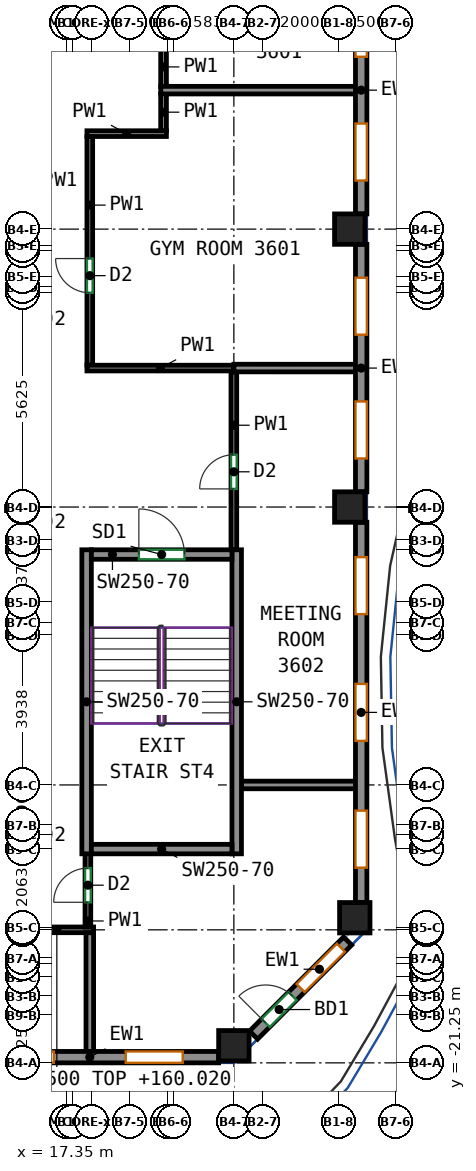
"""IFC4 building model, lengths in metres.
Left out: names, types, materials, properties, quantities, classifications, styles, units other than length and angle.
Written with IfcOpenShell. Run it as: python <this file> out.ifc"""

import sys

from ifc_helpers import new_model, si_unit, direction, frame, frame_2d, origin, origin_2d, place, context, subcontext, project, spatial, rectangle, extrude, source, transform, mapped, element, fill, save


model = new_model("IFC4")
c1 = context("Model", 3, precision=1e-05, world=origin(), true_north=direction((0.0, 1.0)))
c2 = subcontext(c1, "Body", "Model", "MODEL_VIEW")
j1 = project(units=[si_unit("LENGTHUNIT", "METRE"), si_unit("PLANEANGLEUNIT", "RADIAN")], contexts=[c1])
p1 = place(None, origin())
s1 = spatial("IfcSite", under=j1, at=p1, CompositionType="ELEMENT")
p2 = place(p1, origin())
s2 = spatial("IfcBuilding", under=s1, at=p2, CompositionType="ELEMENT")
p3 = place(p2, frame((0.0, 0.0, 157.5)))
s3 = spatial("IfcBuildingStorey", under=s2, at=p3, CompositionType="ELEMENT", Elevation=157.5)
m1 = source(origin(), c2, "Body", "SweptSolid", [
    extrude(rectangle(XDim=0.8, YDim=0.8, at=origin_2d()), origin(), (0.0, 0.0, 1.0), 3.12),
])
for number, where, z_axis, x_axis in (
    (1, (21.75, -20.8, 0.0), (0.0, 0.0, 1.0), (1.0, 0.0, 0.0)),
    (2, (24.8, -6.625, 0.0), (0.0, 0.0, 1.0), (1.0, 0.0, 0.0)),
    (3, (24.8, 0.688, 0.0), (0.0, 0.0, 1.0), (1.0, 0.0, 0.0)),
    (4, (24.932, -17.432, 0.0), (0.0, 0.0, 1.0), (1.0, 0.0, 0.0)),
):
    element("IfcColumn", number, at=place(p3, frame(where, z_axis=z_axis, x_axis=x_axis)), inside=s3, PredefinedType="COLUMN", context=c2, shape_type="MappedRepresentation", body=[
        mapped(m1, transform((0.0, 0.0, 0.0))),
    ])
m2 = source(origin(), c2, "Body", "SweptSolid", [
    extrude(rectangle(XDim=8.0, YDim=0.25, at=frame_2d((4.0, 0.0))), origin(), (0.0, 0.0, 1.0), 3.12),
])
for number, where, z_axis, x_axis in (
    (5, (17.875, -15.75, 0.0), (0.0, 0.0, 1.0), (0.0, 1.0, 0.0)),
    (6, (21.825, -15.75, 0.0), (0.0, 0.0, 1.0), (0.0, 1.0, 0.0)),
):
    element("IfcWall", number, at=place(p3, frame(where, z_axis=z_axis, x_axis=x_axis)), inside=s3, PredefinedType="SHEAR", context=c2, shape_type="MappedRepresentation", body=[
        mapped(m2, transform((0.0, 0.0, 0.0))),
    ])
m3 = source(origin(), c2, "Body", "SweptSolid", [
    extrude(rectangle(XDim=3.7, YDim=0.25, at=frame_2d((1.85, 0.0))), origin(), (0.0, 0.0, 1.0), 3.12),
])
p4 = place(p3, frame((18.0, -15.625, 0.0), z_axis=(0.0, 0.0, 1.0), x_axis=(1.0, 0.0, 0.0)))
e7 = element("IfcWall", 7, at=p4, inside=s3, PredefinedType="SHEAR", context=c2, shape_type="MappedRepresentation", body=[
    mapped(m3, transform((0.0, 0.0, 0.0))),
])
p5 = place(p3, frame((18.0, -7.875, 0.0), z_axis=(0.0, 0.0, 1.0), x_axis=(1.0, 0.0, 0.0)))
e8 = element("IfcWall", 8, at=p5, inside=s3, PredefinedType="SHEAR", context=c2, shape_type="MappedRepresentation", body=[
    mapped(m3, transform((0.0, 0.0, 0.0))),
])
p6 = place(p5, frame((1.25, 0.0, 0.0)))
e9 = element("IfcOpeningElement", 9, at=p6, cuts=e8, PredefinedType="OPENING", context=c2, shape_type="SweptSolid", body=[
    extrude(rectangle(XDim=1.2, YDim=2.1, at=frame_2d((0.6, 1.05))), frame((0.0, 0.135, 0.0), z_axis=(0.0, -1.0, 0.0), x_axis=(1.0, 0.0, 0.0)), (0.0, 0.0, 1.0), 0.27),
])
m4 = source(origin(), c2, "Body", "SweptSolid", [
    extrude(rectangle(XDim=6.783, YDim=0.3, at=frame_2d((3.392, 0.0))), origin(), (0.0, 0.0, 1.0), 3.12),
])
p7 = place(p3, frame((14.567, -21.1, 0.0), z_axis=(0.0, 0.0, 1.0), x_axis=(1.0, 0.0, 0.0)))
e10 = element("IfcWall", 10, at=p7, inside=s3, PredefinedType="SOLIDWALL", context=c2, shape_type="MappedRepresentation", body=[
    mapped(m4, transform((0.0, 0.0, 0.0))),
])
p8 = place(p7, frame((0.946, 0.0, 0.85)))
e11 = element("IfcOpeningElement", 11, at=p8, cuts=e10, PredefinedType="OPENING", context=c2, shape_type="SweptSolid", body=[
    extrude(rectangle(XDim=1.5, YDim=1.95, at=frame_2d((0.75, 0.975))), frame((0.0, 0.16, 0.0), z_axis=(0.0, -1.0, 0.0), x_axis=(1.0, 0.0, 0.0)), (0.0, 0.0, 1.0), 0.32),
])
p9 = place(p7, frame((4.337, 0.0, 0.85)))
e12 = element("IfcOpeningElement", 12, at=p9, cuts=e10, PredefinedType="OPENING", context=c2, shape_type="SweptSolid", body=[
    extrude(rectangle(XDim=1.5, YDim=1.95, at=frame_2d((0.75, 0.975))), frame((0.0, 0.16, 0.0), z_axis=(0.0, -1.0, 0.0), x_axis=(1.0, 0.0, 0.0)), (0.0, 0.0, 1.0), 0.32),
])
m5 = source(origin(), c2, "Body", "SweptSolid", [
    extrude(rectangle(XDim=3.5, YDim=0.3, at=frame_2d((1.75, 0.0))), origin(), (0.0, 0.0, 1.0), 3.12),
])
p10 = place(p3, frame((22.269, -20.519, 0.0), z_axis=(0.0, 0.0, 1.0), x_axis=(0.707141656123, 0.70707190453, 0.0)))
e13 = element("IfcWall", 13, at=p10, inside=s3, PredefinedType="SOLIDWALL", context=c2, shape_type="MappedRepresentation", body=[
    mapped(m5, transform((0.0, 0.0, 0.0))),
])
p11 = place(p10, frame((1.75, 0.0, 0.85)))
e14 = element("IfcOpeningElement", 14, at=p11, cuts=e13, PredefinedType="OPENING", context=c2, shape_type="SweptSolid", body=[
    extrude(rectangle(XDim=1.5, YDim=1.95, at=frame_2d((0.75, 0.975))), frame((0.0, 0.16, 0.0), z_axis=(0.0, -1.0, 0.0), x_axis=(1.0, 0.0, 0.0)), (0.0, 0.0, 1.0), 0.32),
])
p12 = place(p10, frame((0.45, 0.0, 0.0)))
e15 = element("IfcOpeningElement", 15, at=p12, cuts=e13, PredefinedType="OPENING", context=c2, shape_type="SweptSolid", body=[
    extrude(rectangle(XDim=1.0, YDim=2.1, at=frame_2d((0.5, 1.05))), frame((0.0, 0.16, 0.0), z_axis=(0.0, -1.0, 0.0), x_axis=(1.0, 0.0, 0.0)), (0.0, 0.0, 1.0), 0.32),
])
m6 = source(origin(), c2, "Body", "SweptSolid", [
    extrude(rectangle(XDim=10.007, YDim=0.3, at=frame_2d((5.003, 0.0))), origin(), (0.0, 0.0, 1.0), 3.12),
])
p13 = place(p3, frame((25.1, -17.032, 0.0), z_axis=(0.0, 0.0, 1.0), x_axis=(0.0, 1.0, 0.0)))
e16 = element("IfcWall", 16, at=p13, inside=s3, PredefinedType="SOLIDWALL", context=c2, shape_type="MappedRepresentation", body=[
    mapped(m6, transform((0.0, 0.0, 0.0))),
])
p14 = place(p13, frame((0.918, 0.0, 0.85)))
e17 = element("IfcOpeningElement", 17, at=p14, cuts=e16, PredefinedType="OPENING", context=c2, shape_type="SweptSolid", body=[
    extrude(rectangle(XDim=1.5, YDim=1.95, at=frame_2d((0.75, 0.975))), frame((0.0, 0.16, 0.0), z_axis=(0.0, -1.0, 0.0), x_axis=(1.0, 0.0, 0.0)), (0.0, 0.0, 1.0), 0.32),
])
p15 = place(p13, frame((4.253, 0.0, 0.85)))
e18 = element("IfcOpeningElement", 18, at=p15, cuts=e16, PredefinedType="OPENING", context=c2, shape_type="SweptSolid", body=[
    extrude(rectangle(XDim=1.5, YDim=1.95, at=frame_2d((0.75, 0.975))), frame((0.0, 0.16, 0.0), z_axis=(0.0, -1.0, 0.0), x_axis=(1.0, 0.0, 0.0)), (0.0, 0.0, 1.0), 0.32),
])
p16 = place(p13, frame((7.589, 0.0, 0.85)))
e19 = element("IfcOpeningElement", 19, at=p16, cuts=e16, PredefinedType="OPENING", context=c2, shape_type="SweptSolid", body=[
    extrude(rectangle(XDim=1.5, YDim=1.95, at=frame_2d((0.75, 0.975))), frame((0.0, 0.16, 0.0), z_axis=(0.0, -1.0, 0.0), x_axis=(1.0, 0.0, 0.0)), (0.0, 0.0, 1.0), 0.32),
])
m7 = source(origin(), c2, "Body", "SweptSolid", [
    extrude(rectangle(XDim=6.513, YDim=0.3, at=frame_2d((3.256, 0.0))), origin(), (0.0, 0.0, 1.0), 3.12),
])
p17 = place(p3, frame((25.1, -6.225, 0.0), z_axis=(0.0, 0.0, 1.0), x_axis=(0.0, 1.0, 0.0)))
e20 = element("IfcWall", 20, at=p17, inside=s3, PredefinedType="SOLIDWALL", context=c2, shape_type="MappedRepresentation", body=[
    mapped(m7, transform((0.0, 0.0, 0.0))),
])
p18 = place(p17, frame((0.878, 0.0, 0.85)))
e21 = element("IfcOpeningElement", 21, at=p18, cuts=e20, PredefinedType="OPENING", context=c2, shape_type="SweptSolid", body=[
    extrude(rectangle(XDim=1.5, YDim=1.95, at=frame_2d((0.75, 0.975))), frame((0.0, 0.16, 0.0), z_axis=(0.0, -1.0, 0.0), x_axis=(1.0, 0.0, 0.0)), (0.0, 0.0, 1.0), 0.32),
])
p19 = place(p17, frame((4.135, 0.0, 0.85)))
e22 = element("IfcOpeningElement", 22, at=p19, cuts=e20, PredefinedType="OPENING", context=c2, shape_type="SweptSolid", body=[
    extrude(rectangle(XDim=1.5, YDim=1.95, at=frame_2d((0.75, 0.975))), frame((0.0, 0.16, 0.0), z_axis=(0.0, -1.0, 0.0), x_axis=(1.0, 0.0, 0.0)), (0.0, 0.0, 1.0), 0.32),
])
p20 = place(p3, frame((25.1, 1.087, 0.0), z_axis=(0.0, 0.0, 1.0), x_axis=(0.0, 1.0, 0.0)))
e23 = element("IfcWall", 23, at=p20, inside=s3, PredefinedType="SOLIDWALL", context=c2, shape_type="MappedRepresentation", body=[
    mapped(m7, transform((0.0, 0.0, 0.0))),
])
p21 = place(p20, frame((0.878, 0.0, 0.85)))
e24 = element("IfcOpeningElement", 24, at=p21, cuts=e23, PredefinedType="OPENING", context=c2, shape_type="SweptSolid", body=[
    extrude(rectangle(XDim=1.5, YDim=1.95, at=frame_2d((0.75, 0.975))), frame((0.0, 0.16, 0.0), z_axis=(0.0, -1.0, 0.0), x_axis=(1.0, 0.0, 0.0)), (0.0, 0.0, 1.0), 0.32),
])
p22 = place(p20, frame((4.135, 0.0, 0.85)))
e25 = element("IfcOpeningElement", 25, at=p22, cuts=e23, PredefinedType="OPENING", context=c2, shape_type="SweptSolid", body=[
    extrude(rectangle(XDim=1.5, YDim=1.95, at=frame_2d((0.75, 0.975))), frame((0.0, 0.16, 0.0), z_axis=(0.0, -1.0, 0.0), x_axis=(1.0, 0.0, 0.0)), (0.0, 0.0, 1.0), 0.32),
])
p23 = place(p3, frame((16.125, -17.75, 0.0), z_axis=(0.0, 0.0, 1.0), x_axis=(1.0, 0.0, 0.0)))
e26 = element("IfcWall", 26, at=p23, inside=s3, PredefinedType="PARTITIONING", context=c2, shape_type="SweptSolid", body=[
    extrude(rectangle(XDim=1.934, YDim=0.15, at=frame_2d((0.967, 0.0))), origin(), (0.0, 0.0, 1.0), 2.52),
])
p24 = place(p3, frame((17.909, -17.675, 0.0), z_axis=(0.0, 0.0, 1.0), x_axis=(0.0, 1.0, 0.0)))
e27 = element("IfcWall", 27, at=p24, inside=s3, PredefinedType="PARTITIONING", context=c2, shape_type="SweptSolid", body=[
    extrude(rectangle(XDim=1.975, YDim=0.15, at=frame_2d((0.988, 0.0))), origin(), (0.0, 0.0, 1.0), 3.12),
])
p25 = place(p24, frame((0.65, 0.0, 0.0)))
e28 = element("IfcOpeningElement", 28, at=p25, cuts=e27, PredefinedType="OPENING", context=c2, shape_type="SweptSolid", body=[
    extrude(rectangle(XDim=0.9, YDim=2.1, at=frame_2d((0.45, 1.05))), frame((0.0, 0.085, 0.0), z_axis=(0.0, -1.0, 0.0), x_axis=(1.0, 0.0, 0.0)), (0.0, 0.0, 1.0), 0.17),
])
p26 = place(p3, frame((19.9, 4.434, 0.0), z_axis=(0.0, 0.0, 1.0), x_axis=(0.0, 1.0, 0.0)))
e29 = element("IfcWall", 29, at=p26, inside=s3, PredefinedType="PARTITIONING", context=c2, shape_type="SweptSolid", body=[
    extrude(rectangle(XDim=3.476, YDim=0.15, at=frame_2d((1.738, 0.0))), origin(), (0.0, 0.0, 1.0), 3.12),
])
p27 = place(p26, frame((1.236, 0.0, 0.0)))
e30 = element("IfcOpeningElement", 30, at=p27, cuts=e29, PredefinedType="OPENING", context=c2, shape_type="SweptSolid", body=[
    extrude(rectangle(XDim=0.9, YDim=2.1, at=frame_2d((0.45, 1.05))), frame((0.0, 0.085, 0.0), z_axis=(0.0, -1.0, 0.0), x_axis=(1.0, 0.0, 0.0)), (0.0, 0.0, 1.0), 0.17),
])
p28 = place(p3, frame((19.9, 3.275, 0.0), z_axis=(0.0, 0.0, 1.0), x_axis=(0.0, 1.0, 0.0)))
e31 = element("IfcWall", 31, at=p28, inside=s3, PredefinedType="PARTITIONING", context=c2, shape_type="SweptSolid", body=[
    extrude(rectangle(XDim=0.979, YDim=0.15, at=frame_2d((0.49, 0.0))), origin(), (0.0, 0.0, 1.0), 3.12),
])
p29 = place(p3, frame((17.884, 3.2, 0.0), z_axis=(0.0, 0.0, 1.0), x_axis=(1.0, 0.0, 0.0)))
e32 = element("IfcWall", 32, at=p29, inside=s3, PredefinedType="PARTITIONING", context=c2, shape_type="SweptSolid", body=[
    extrude(rectangle(XDim=2.091, YDim=0.15, at=frame_2d((1.045, 0.0))), origin(), (0.0, 0.0, 1.0), 3.12),
])
p30 = place(p3, frame((17.959, -2.894, 0.0), z_axis=(0.0, 0.0, 1.0), x_axis=(0.0, 1.0, 0.0)))
e33 = element("IfcWall", 33, at=p30, inside=s3, PredefinedType="PARTITIONING", context=c2, shape_type="SweptSolid", body=[
    extrude(rectangle(XDim=6.019, YDim=0.15, at=frame_2d((3.01, 0.0))), origin(), (0.0, 0.0, 1.0), 3.12),
])
p31 = place(p30, frame((1.907, 0.0, 0.0)))
e34 = element("IfcOpeningElement", 34, at=p31, cuts=e33, PredefinedType="OPENING", context=c2, shape_type="SweptSolid", body=[
    extrude(rectangle(XDim=0.9, YDim=2.1, at=frame_2d((0.45, 1.05))), frame((0.0, 0.085, 0.0), z_axis=(0.0, -1.0, 0.0), x_axis=(1.0, 0.0, 0.0)), (0.0, 0.0, 1.0), 0.17),
])
p32 = place(p3, frame((21.751, -2.969, 0.0), z_axis=(0.0, 0.0, 1.0), x_axis=(-1.0, 0.0, 0.0)))
e35 = element("IfcWall", 35, at=p32, inside=s3, PredefinedType="PARTITIONING", context=c2, shape_type="SweptSolid", body=[
    extrude(rectangle(XDim=3.867, YDim=0.15, at=frame_2d((1.934, 0.0))), origin(), (0.0, 0.0, 1.0), 3.12),
])
p33 = place(p3, frame((21.75, -7.75, 0.0), z_axis=(0.0, 0.0, 1.0), x_axis=(0.0, 1.0, 0.0)))
e36 = element("IfcWall", 36, at=p33, inside=s3, PredefinedType="PARTITIONING", context=c2, shape_type="SweptSolid", body=[
    extrude(rectangle(XDim=4.682, YDim=0.15, at=frame_2d((2.341, 0.0))), origin(), (0.0, 0.0, 1.0), 3.12),
])
p34 = place(p33, frame((1.602, 0.0, 0.0)))
e37 = element("IfcOpeningElement", 37, at=p34, cuts=e36, PredefinedType="OPENING", context=c2, shape_type="SweptSolid", body=[
    extrude(rectangle(XDim=0.9, YDim=2.1, at=frame_2d((0.45, 1.05))), frame((0.0, 0.085, 0.0), z_axis=(0.0, -1.0, 0.0), x_axis=(1.0, 0.0, 0.0)), (0.0, 0.0, 1.0), 0.17),
])
p35 = place(p3, frame((17.959, -21.0, 0.0), z_axis=(0.0, 0.0, 1.0), x_axis=(0.0, 1.0, 0.0)))
e38 = element("IfcWall", 38, at=p35, inside=s3, PredefinedType="PARTITIONING", context=c2, shape_type="SweptSolid", body=[
    extrude(rectangle(XDim=3.173, YDim=0.2, at=frame_2d((1.586, 0.0))), origin(), (0.0, 0.0, 1.0), 3.12),
])
p36 = place(p3, frame((25.0, -13.938, 0.0), z_axis=(0.0, 0.0, 1.0), x_axis=(-1.0, 0.0, 0.0)))
e39 = element("IfcWall", 39, at=p36, inside=s3, PredefinedType="PARTITIONING", context=c2, shape_type="SweptSolid", body=[
    extrude(rectangle(XDim=3.05, YDim=0.2, at=frame_2d((1.525, 0.0))), origin(), (0.0, 0.0, 1.0), 3.12),
])
p37 = place(p3, frame((19.827, 4.344, 0.0), z_axis=(0.0, 0.0, 1.0), x_axis=(1.0, 0.0, 0.0)))
e40 = element("IfcWall", 40, at=p37, inside=s3, PredefinedType="PARTITIONING", context=c2, shape_type="SweptSolid", body=[
    extrude(rectangle(XDim=5.173, YDim=0.2, at=frame_2d((2.586, 0.0))), origin(), (0.0, 0.0, 1.0), 3.12),
])
p38 = place(p3, frame((21.751, -2.968, 0.0), z_axis=(0.0, 0.0, 1.0), x_axis=(0.999999954829, -0.000300571071, 0.0)))
e41 = element("IfcWall", 41, at=p38, inside=s3, PredefinedType="PARTITIONING", context=c2, shape_type="SweptSolid", body=[
    extrude(rectangle(XDim=3.249, YDim=0.2, at=frame_2d((1.625, 0.0))), origin(), (0.0, 0.0, 1.0), 3.12),
])
p39 = place(p8, origin())
e42 = element("IfcWindow", 42, at=p39, inside=s3, PartitioningType="SINGLE_PANEL", PredefinedType="WINDOW", context=c2, shape_type="SweptSolid", body=[
    extrude(rectangle(XDim=1.5, YDim=1.95, at=frame_2d((0.75, 0.975))), frame((0.0, 0.03, 0.0), z_axis=(0.0, -1.0, 0.0), x_axis=(1.0, 0.0, 0.0)), (0.0, 0.0, 1.0), 0.06),
])
fill(e11, e42)
p40 = place(p9, origin())
e43 = element("IfcWindow", 43, at=p40, inside=s3, PartitioningType="SINGLE_PANEL", PredefinedType="WINDOW", context=c2, shape_type="SweptSolid", body=[
    extrude(rectangle(XDim=1.5, YDim=1.95, at=frame_2d((0.75, 0.975))), frame((0.0, 0.03, 0.0), z_axis=(0.0, -1.0, 0.0), x_axis=(1.0, 0.0, 0.0)), (0.0, 0.0, 1.0), 0.06),
])
fill(e12, e43)
p41 = place(p11, origin())
e44 = element("IfcWindow", 44, at=p41, inside=s3, PartitioningType="SINGLE_PANEL", PredefinedType="WINDOW", context=c2, shape_type="SweptSolid", body=[
    extrude(rectangle(XDim=1.5, YDim=1.95, at=frame_2d((0.75, 0.975))), frame((0.0, 0.03, 0.0), z_axis=(0.0, -1.0, 0.0), x_axis=(1.0, 0.0, 0.0)), (0.0, 0.0, 1.0), 0.06),
])
fill(e14, e44)
p42 = place(p12, origin())
e45 = element("IfcDoor", 45, at=p42, inside=s3, OperationType="SINGLE_SWING_LEFT", PredefinedType="DOOR", context=c2, shape_type="SweptSolid", body=[
    extrude(rectangle(XDim=1.0, YDim=2.1, at=frame_2d((0.5, 1.05))), frame((0.0, 0.025, 0.0), z_axis=(0.0, -1.0, 0.0), x_axis=(1.0, 0.0, 0.0)), (0.0, 0.0, 1.0), 0.05),
])
fill(e15, e45)
p43 = place(p14, origin())
e46 = element("IfcWindow", 46, at=p43, inside=s3, PartitioningType="SINGLE_PANEL", PredefinedType="WINDOW", context=c2, shape_type="SweptSolid", body=[
    extrude(rectangle(XDim=1.5, YDim=1.95, at=frame_2d((0.75, 0.975))), frame((0.0, 0.03, 0.0), z_axis=(0.0, -1.0, 0.0), x_axis=(1.0, 0.0, 0.0)), (0.0, 0.0, 1.0), 0.06),
])
fill(e17, e46)
p44 = place(p15, origin())
e47 = element("IfcWindow", 47, at=p44, inside=s3, PartitioningType="SINGLE_PANEL", PredefinedType="WINDOW", context=c2, shape_type="SweptSolid", body=[
    extrude(rectangle(XDim=1.5, YDim=1.95, at=frame_2d((0.75, 0.975))), frame((0.0, 0.03, 0.0), z_axis=(0.0, -1.0, 0.0), x_axis=(1.0, 0.0, 0.0)), (0.0, 0.0, 1.0), 0.06),
])
fill(e18, e47)
p45 = place(p16, origin())
e48 = element("IfcWindow", 48, at=p45, inside=s3, PartitioningType="SINGLE_PANEL", PredefinedType="WINDOW", context=c2, shape_type="SweptSolid", body=[
    extrude(rectangle(XDim=1.5, YDim=1.95, at=frame_2d((0.75, 0.975))), frame((0.0, 0.03, 0.0), z_axis=(0.0, -1.0, 0.0), x_axis=(1.0, 0.0, 0.0)), (0.0, 0.0, 1.0), 0.06),
])
fill(e19, e48)
p46 = place(p18, origin())
e49 = element("IfcWindow", 49, at=p46, inside=s3, PartitioningType="SINGLE_PANEL", PredefinedType="WINDOW", context=c2, shape_type="SweptSolid", body=[
    extrude(rectangle(XDim=1.5, YDim=1.95, at=frame_2d((0.75, 0.975))), frame((0.0, 0.03, 0.0), z_axis=(0.0, -1.0, 0.0), x_axis=(1.0, 0.0, 0.0)), (0.0, 0.0, 1.0), 0.06),
])
fill(e21, e49)
p47 = place(p19, origin())
e50 = element("IfcWindow", 50, at=p47, inside=s3, PartitioningType="SINGLE_PANEL", PredefinedType="WINDOW", context=c2, shape_type="SweptSolid", body=[
    extrude(rectangle(XDim=1.5, YDim=1.95, at=frame_2d((0.75, 0.975))), frame((0.0, 0.03, 0.0), z_axis=(0.0, -1.0, 0.0), x_axis=(1.0, 0.0, 0.0)), (0.0, 0.0, 1.0), 0.06),
])
fill(e22, e50)
p48 = place(p21, origin())
e51 = element("IfcWindow", 51, at=p48, inside=s3, PartitioningType="SINGLE_PANEL", PredefinedType="WINDOW", context=c2, shape_type="SweptSolid", body=[
    extrude(rectangle(XDim=1.5, YDim=1.95, at=frame_2d((0.75, 0.975))), frame((0.0, 0.03, 0.0), z_axis=(0.0, -1.0, 0.0), x_axis=(1.0, 0.0, 0.0)), (0.0, 0.0, 1.0), 0.06),
])
fill(e24, e51)
p49 = place(p22, origin())
e52 = element("IfcWindow", 52, at=p49, inside=s3, PartitioningType="SINGLE_PANEL", PredefinedType="WINDOW", context=c2, shape_type="SweptSolid", body=[
    extrude(rectangle(XDim=1.5, YDim=1.95, at=frame_2d((0.75, 0.975))), frame((0.0, 0.03, 0.0), z_axis=(0.0, -1.0, 0.0), x_axis=(1.0, 0.0, 0.0)), (0.0, 0.0, 1.0), 0.06),
])
fill(e25, e52)
p50 = place(p6, origin())
e53 = element("IfcDoor", 53, at=p50, inside=s3, OperationType="DOUBLE_DOOR_SINGLE_SWING", PredefinedType="DOOR", context=c2, shape_type="SweptSolid", body=[
    extrude(rectangle(XDim=1.2, YDim=2.1, at=frame_2d((0.6, 1.05))), frame((0.0, 0.025, 0.0), z_axis=(0.0, -1.0, 0.0), x_axis=(1.0, 0.0, 0.0)), (0.0, 0.0, 1.0), 0.05),
])
fill(e9, e53)
p51 = place(p25, origin())
e54 = element("IfcDoor", 54, at=p51, inside=s3, OperationType="SINGLE_SWING_LEFT", PredefinedType="DOOR", context=c2, shape_type="SweptSolid", body=[
    extrude(rectangle(XDim=0.9, YDim=2.1, at=frame_2d((0.45, 1.05))), frame((0.0, 0.025, 0.0), z_axis=(0.0, -1.0, 0.0), x_axis=(1.0, 0.0, 0.0)), (0.0, 0.0, 1.0), 0.05),
])
fill(e28, e54)
p52 = place(p34, origin())
e55 = element("IfcDoor", 55, at=p52, inside=s3, OperationType="SINGLE_SWING_LEFT", PredefinedType="DOOR", context=c2, shape_type="SweptSolid", body=[
    extrude(rectangle(XDim=0.9, YDim=2.1, at=frame_2d((0.45, 1.05))), frame((0.0, 0.025, 0.0), z_axis=(0.0, -1.0, 0.0), x_axis=(1.0, 0.0, 0.0)), (0.0, 0.0, 1.0), 0.05),
])
fill(e37, e55)
p53 = place(p31, origin())
e56 = element("IfcDoor", 56, at=p53, inside=s3, OperationType="SINGLE_SWING_RIGHT", PredefinedType="DOOR", context=c2, shape_type="SweptSolid", body=[
    extrude(rectangle(XDim=0.9, YDim=2.1, at=frame_2d((0.45, 1.05))), frame((0.0, 0.025, 0.0), z_axis=(0.0, -1.0, 0.0), x_axis=(1.0, 0.0, 0.0)), (0.0, 0.0, 1.0), 0.05),
])
fill(e34, e56)
save(model, sys.argv[1])
